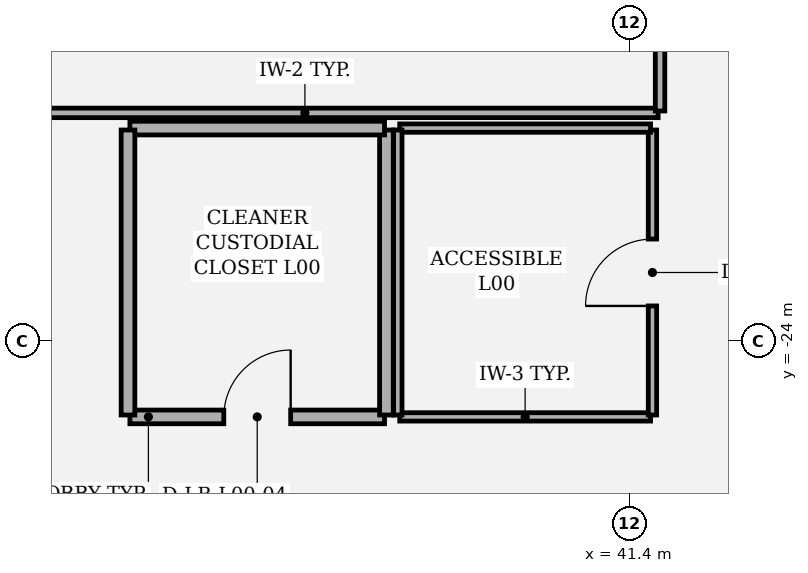
"""IFC4 building model, lengths in metres.
Left out: names, types, materials, properties, quantities, classifications, styles, units other than length and angle.
Written with IfcOpenShell. Run it as: python <this file> out.ifc"""

import sys

from ifc_helpers import new_model, si_unit, direction, frame, frame_2d, origin, place, context, subcontext, project, spatial, rectangle, extrude, element, fill, save


model = new_model("IFC4")
c1 = context("Model", 3, precision=1e-05, world=origin(), true_north=direction((0.0, 1.0)))
c2 = subcontext(c1, "Body", "Model", "MODEL_VIEW")
j1 = project(units=[si_unit("LENGTHUNIT", "METRE"), si_unit("PLANEANGLEUNIT", "RADIAN")], contexts=[c1])
p1 = place(None, origin())
s1 = spatial("IfcSite", under=j1, at=p1, CompositionType="ELEMENT")
p2 = place(p1, origin())
s2 = spatial("IfcBuilding", under=s1, at=p2, CompositionType="ELEMENT")
p3 = place(p2, origin())
s3 = spatial("IfcBuildingStorey", under=s2, at=p3, CompositionType="ELEMENT", Elevation=0.0)
p4 = place(p3, frame((38.375, -25.0, 0.0), z_axis=(0.0, 0.0, 1.0), x_axis=(1.0, 0.0, 0.0)))
e1 = element("IfcWall", 1, at=p4, inside=s3, PredefinedType="PARTITIONING", context=c2, shape_type="SweptSolid", body=[
    extrude(rectangle(XDim=3.3, YDim=0.11, at=frame_2d((1.65, 0.0))), origin(), (0.0, 0.0, 1.0), 6.34),
])
p5 = place(p3, frame((41.7, -24.975, 0.0), z_axis=(0.0, 0.0, 1.0), x_axis=(0.0, 1.0, 0.0)))
e2 = element("IfcWall", 2, at=p5, inside=s3, PredefinedType="PARTITIONING", context=c2, shape_type="SweptSolid", body=[
    extrude(rectangle(XDim=3.75, YDim=0.11, at=frame_2d((1.875, 0.0))), origin(), (0.0, 0.0, 1.0), 5.694),
])
p6 = place(p5, frame((1.435, 0.0, 0.0)))
e3 = element("IfcOpeningElement", 3, at=p6, cuts=e2, PredefinedType="OPENING", context=c2, shape_type="SweptSolid", body=[
    extrude(rectangle(XDim=0.88, YDim=2.1, at=frame_2d((0.44, 1.05))), frame((0.0, 0.065, 0.0), z_axis=(0.0, -1.0, 0.0), x_axis=(1.0, 0.0, 0.0)), (0.0, 0.0, 1.0), 0.13),
])
p7 = place(p3, frame((41.675, -21.2, 0.0), z_axis=(0.0, 0.0, 1.0), x_axis=(-1.0, 0.0, 0.0)))
e4 = element("IfcWall", 4, at=p7, inside=s3, PredefinedType="PARTITIONING", context=c2, shape_type="SweptSolid", body=[
    extrude(rectangle(XDim=3.3, YDim=0.11, at=frame_2d((1.65, 0.0))), origin(), (0.0, 0.0, 1.0), 6.34),
])
p8 = place(p3, frame((38.35, -21.225, 0.0), z_axis=(0.0, 0.0, 1.0), x_axis=(0.0, -1.0, 0.0)))
e5 = element("IfcWall", 5, at=p8, inside=s3, PredefinedType="PARTITIONING", context=c2, shape_type="SweptSolid", body=[
    extrude(rectangle(XDim=3.75, YDim=0.11, at=frame_2d((1.875, 0.0))), origin(), (0.0, 0.0, 1.0), 6.34),
])
p9 = place(p3, frame((34.825, -25.0, 0.0), z_axis=(0.0, 0.0, 1.0), x_axis=(1.0, 0.0, 0.0)))
e6 = element("IfcWall", 6, at=p9, inside=s3, PredefinedType="PARTITIONING", context=c2, shape_type="SweptSolid", body=[
    extrude(rectangle(XDim=3.35, YDim=0.18, at=frame_2d((1.675, 0.0))), origin(), (0.0, 0.0, 1.0), 6.34),
])
p10 = place(p9, frame((1.235, 0.0, 0.0)))
e7 = element("IfcOpeningElement", 7, at=p10, cuts=e6, PredefinedType="OPENING", context=c2, shape_type="SweptSolid", body=[
    extrude(rectangle(XDim=0.88, YDim=2.1, at=frame_2d((0.44, 1.05))), frame((0.0, 0.1, 0.0), z_axis=(0.0, -1.0, 0.0), x_axis=(1.0, 0.0, 0.0)), (0.0, 0.0, 1.0), 0.2),
])
p11 = place(p3, frame((38.2, -24.975, 0.0), z_axis=(0.0, 0.0, 1.0), x_axis=(0.0, 1.0, 0.0)))
e8 = element("IfcWall", 8, at=p11, inside=s3, PredefinedType="PARTITIONING", context=c2, shape_type="SweptSolid", body=[
    extrude(rectangle(XDim=3.75, YDim=0.18, at=frame_2d((1.875, 0.0))), origin(), (0.0, 0.0, 1.0), 6.34),
])
p12 = place(p3, frame((38.175, -21.2, 0.0), z_axis=(0.0, 0.0, 1.0), x_axis=(-1.0, 0.0, 0.0)))
e9 = element("IfcWall", 9, at=p12, inside=s3, PredefinedType="PARTITIONING", context=c2, shape_type="SweptSolid", body=[
    extrude(rectangle(XDim=3.35, YDim=0.18, at=frame_2d((1.675, 0.0))), origin(), (0.0, 0.0, 1.0), 6.34),
])
p13 = place(p3, frame((34.8, -21.225, 0.0), z_axis=(0.0, 0.0, 1.0), x_axis=(0.0, -1.0, 0.0)))
e10 = element("IfcWall", 10, at=p13, inside=s3, PredefinedType="PARTITIONING", context=c2, shape_type="SweptSolid", body=[
    extrude(rectangle(XDim=3.75, YDim=0.18, at=frame_2d((1.875, 0.0))), origin(), (0.0, 0.0, 1.0), 6.34),
])
p14 = place(p3, frame((32.48, -21.0, 0.0), z_axis=(0.0, 0.0, 1.0), x_axis=(1.0, 0.0, 0.0)))
e11 = element("IfcWall", 11, at=p14, inside=s3, PredefinedType="PARTITIONING", context=c2, shape_type="SweptSolid", body=[
    extrude(rectangle(XDim=9.295, YDim=0.125, at=frame_2d((4.647, 0.0))), origin(), (0.0, 0.0, 1.0), 6.34),
])
p15 = place(p3, frame((41.8, -20.975, 0.0), z_axis=(0.0, 0.0, 1.0), x_axis=(0.0, 1.0, 0.0)))
e12 = element("IfcWall", 12, at=p15, inside=s3, PredefinedType="PARTITIONING", context=c2, shape_type="SweptSolid", body=[
    extrude(rectangle(XDim=1.1, YDim=0.125, at=frame_2d((0.55, 0.0))), origin(), (0.0, 0.0, 1.0), 6.34),
])
p16 = place(p6, origin())
e13 = element("IfcDoor", 13, at=p16, inside=s3, OperationType="SINGLE_SWING_LEFT", PredefinedType="DOOR", context=c2, shape_type="SweptSolid", body=[
    extrude(rectangle(XDim=0.88, YDim=2.1, at=frame_2d((0.44, 1.05))), frame((0.0, 0.025, 0.0), z_axis=(0.0, -1.0, 0.0), x_axis=(1.0, 0.0, 0.0)), (0.0, 0.0, 1.0), 0.05),
])
fill(e3, e13)
p17 = place(p10, origin())
e14 = element("IfcDoor", 14, at=p17, inside=s3, OperationType="SINGLE_SWING_RIGHT", PredefinedType="DOOR", context=c2, shape_type="SweptSolid", body=[
    extrude(rectangle(XDim=0.88, YDim=2.1, at=frame_2d((0.44, 1.05))), frame((0.0, 0.025, 0.0), z_axis=(0.0, -1.0, 0.0), x_axis=(1.0, 0.0, 0.0)), (0.0, 0.0, 1.0), 0.05),
])
fill(e7, e14)
save(model, sys.argv[1])
